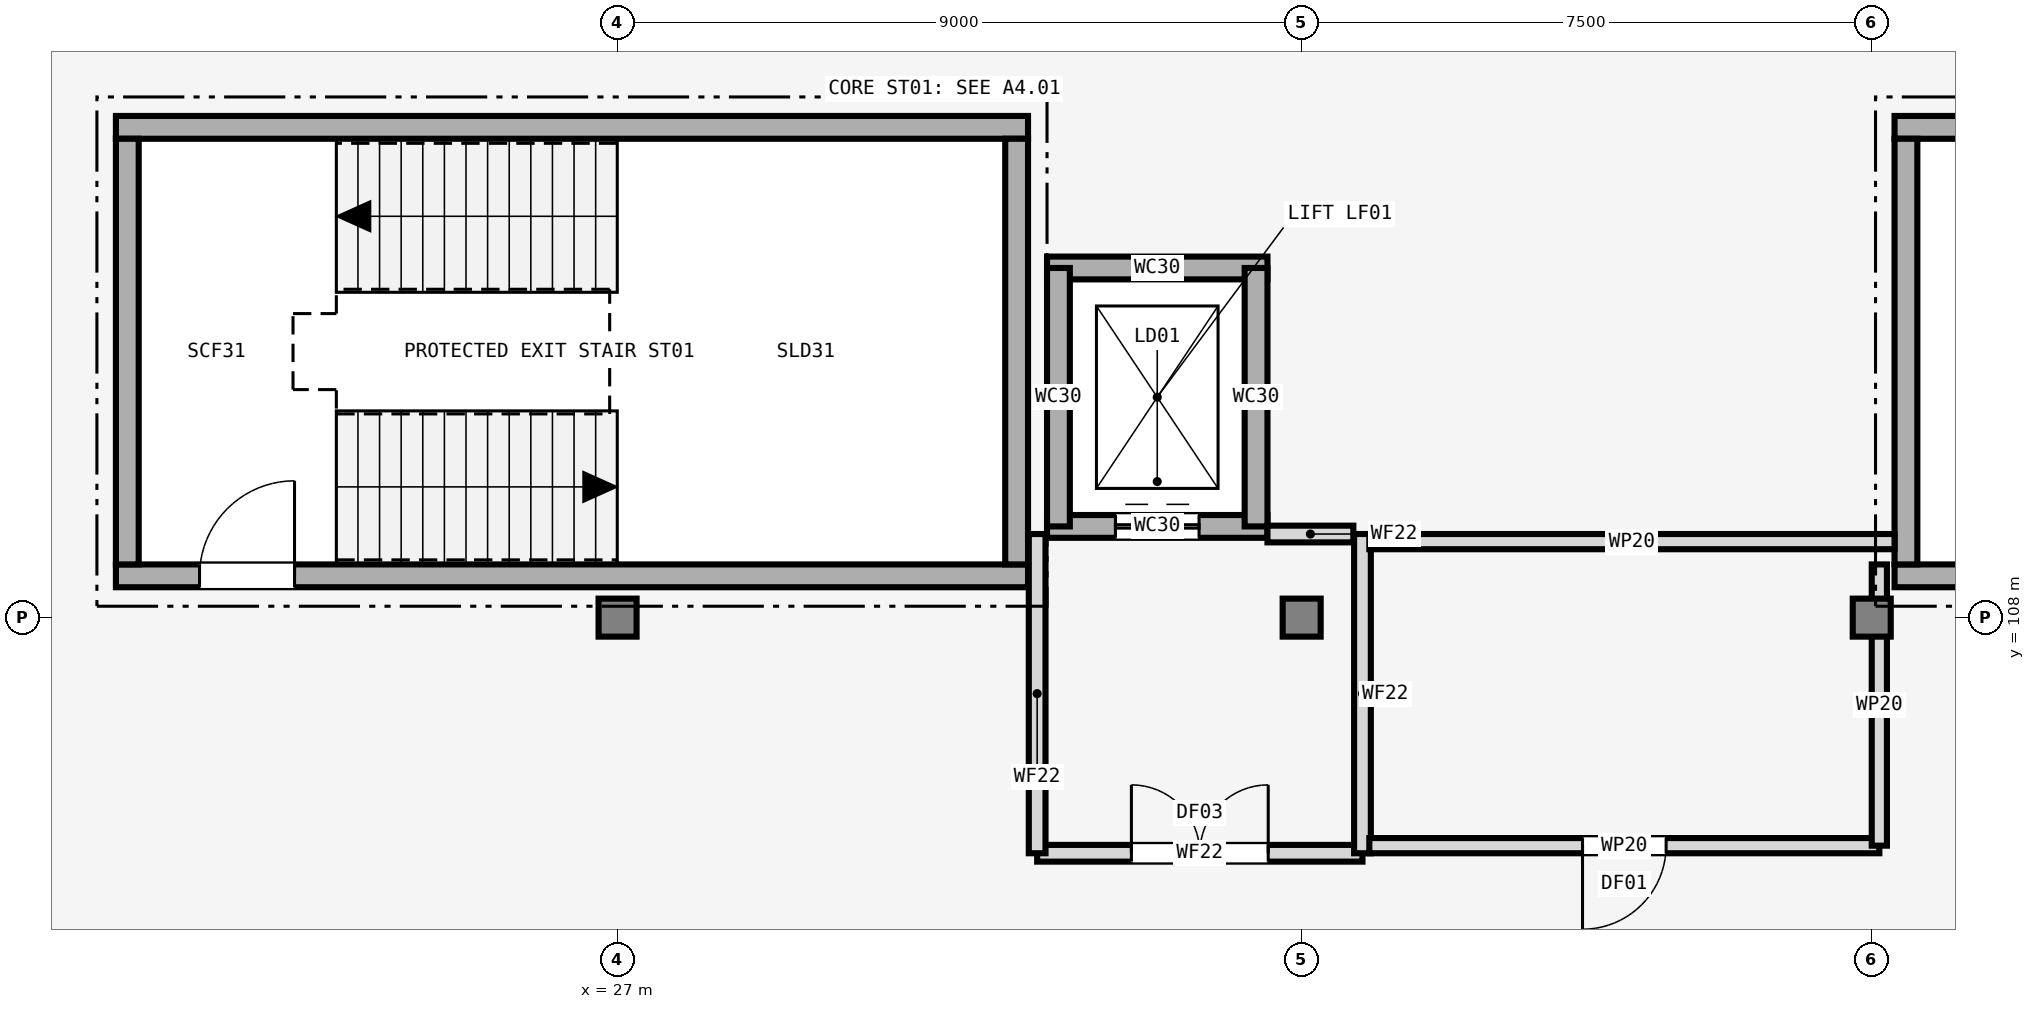
"""IFC4 building model, lengths in metres.
Left out: names, types, materials, properties, quantities, classifications, styles, units other than length and angle.
Written with IfcOpenShell. Run it as: python <this file> out.ifc"""

import sys

from ifc_helpers import new_model, si_unit, direction, frame, frame_2d, origin, origin_2d, place, context, subcontext, project, spatial, rectangle, extrude, element, fill, save


model = new_model("IFC4")
c1 = context("Model", 3, precision=1e-05, world=origin(), true_north=direction((0.0, 1.0)))
c2 = subcontext(c1, "Body", "Model", "MODEL_VIEW")
j1 = project(units=[si_unit("LENGTHUNIT", "METRE"), si_unit("PLANEANGLEUNIT", "RADIAN")], contexts=[c1])
p1 = place(None, origin())
s1 = spatial("IfcSite", under=j1, at=p1, CompositionType="ELEMENT")
p2 = place(p1, origin())
s2 = spatial("IfcBuilding", under=s1, at=p2, CompositionType="ELEMENT")
p3 = place(p2, frame((0.0, 0.0, 13.5)))
s3 = spatial("IfcBuildingStorey", under=s2, at=p3, CompositionType="ELEMENT", Elevation=13.5)
for number, where, z_axis, x_axis in (
    (1, (27.0, 108.0, 0.0), (0.0, 0.0, 1.0), (1.0, 0.0, 0.0)),
    (2, (36.0, 108.0, 0.0), (0.0, 0.0, 1.0), (1.0, 0.0, 0.0)),
    (3, (43.5, 108.0, 0.0), (0.0, 0.0, 1.0), (1.0, 0.0, 0.0)),
):
    element("IfcColumn", number, at=place(p3, frame(where, z_axis=z_axis, x_axis=x_axis)), inside=s3, PredefinedType="COLUMN", context=c2, shape_type="SweptSolid", body=[
        extrude(rectangle(XDim=0.5, YDim=0.5, at=origin_2d()), origin(), (0.0, 0.0, 1.0), 4.2),
    ])
p4 = place(p3, frame((20.4, 108.55, 0.0), z_axis=(0.0, 0.0, 1.0), x_axis=(1.0, 0.0, 0.0)))
e4 = element("IfcWall", 4, at=p4, inside=s3, PredefinedType="SHEAR", context=c2, shape_type="SweptSolid", body=[
    extrude(rectangle(XDim=12.0, YDim=0.3, at=frame_2d((6.0, 0.0))), origin(), (0.0, 0.0, 1.0), 4.2),
])
p5 = place(p4, frame((1.1, 0.0, 0.0)))
e5 = element("IfcOpeningElement", 5, at=p5, cuts=e4, PredefinedType="OPENING", context=c2, shape_type="SweptSolid", body=[
    extrude(rectangle(XDim=1.25, YDim=2.15, at=frame_2d((0.625, 1.075))), frame((0.0, 0.16, 0.0), z_axis=(0.0, -1.0, 0.0), x_axis=(1.0, 0.0, 0.0)), (0.0, 0.0, 1.0), 0.32),
])
p6 = place(p3, frame((32.4, 114.45, 0.0), z_axis=(0.0, 0.0, 1.0), x_axis=(-1.0, 0.0, 0.0)))
e6 = element("IfcWall", 6, at=p6, inside=s3, PredefinedType="SHEAR", context=c2, shape_type="SweptSolid", body=[
    extrude(rectangle(XDim=12.0, YDim=0.3, at=frame_2d((6.0, 0.0))), origin(), (0.0, 0.0, 1.0), 4.2),
])
for number, where, z_axis, x_axis in (
    (7, (20.55, 114.3, 0.0), (0.0, 0.0, 1.0), (0.0, -1.0, 0.0)),
    (8, (32.25, 108.7, 0.0), (0.0, 0.0, 1.0), (0.0, 1.0, 0.0)),
):
    element("IfcWall", number, at=place(p3, frame(where, z_axis=z_axis, x_axis=x_axis)), inside=s3, PredefinedType="SHEAR", context=c2, shape_type="SweptSolid", body=[
        extrude(rectangle(XDim=5.6, YDim=0.3, at=frame_2d((2.8, 0.0))), origin(), (0.0, 0.0, 1.0), 4.2),
    ])
p7 = place(p3, frame((43.8, 108.55, 0.0), z_axis=(0.0, 0.0, 1.0), x_axis=(1.0, 0.0, 0.0)))
e9 = element("IfcWall", 9, at=p7, inside=s3, PredefinedType="SHEAR", context=c2, shape_type="SweptSolid", body=[
    extrude(rectangle(XDim=12.0, YDim=0.3, at=frame_2d((6.0, 0.0))), origin(), (0.0, 0.0, 1.0), 4.2),
])
p8 = place(p7, frame((1.1, 0.0, 0.0)))
e10 = element("IfcOpeningElement", 10, at=p8, cuts=e9, PredefinedType="OPENING", context=c2, shape_type="SweptSolid", body=[
    extrude(rectangle(XDim=1.25, YDim=2.15, at=frame_2d((0.625, 1.075))), frame((0.0, 0.16, 0.0), z_axis=(0.0, -1.0, 0.0), x_axis=(1.0, 0.0, 0.0)), (0.0, 0.0, 1.0), 0.32),
])
p9 = place(p3, frame((55.8, 114.45, 0.0), z_axis=(0.0, 0.0, 1.0), x_axis=(-1.0, 0.0, 0.0)))
e11 = element("IfcWall", 11, at=p9, inside=s3, PredefinedType="SHEAR", context=c2, shape_type="SweptSolid", body=[
    extrude(rectangle(XDim=12.0, YDim=0.3, at=frame_2d((6.0, 0.0))), origin(), (0.0, 0.0, 1.0), 4.2),
])
p10 = place(p3, frame((43.95, 114.3, 0.0), z_axis=(0.0, 0.0, 1.0), x_axis=(0.0, -1.0, 0.0)))
e12 = element("IfcWall", 12, at=p10, inside=s3, PredefinedType="SHEAR", context=c2, shape_type="SweptSolid", body=[
    extrude(rectangle(XDim=5.6, YDim=0.3, at=frame_2d((2.8, 0.0))), origin(), (0.0, 0.0, 1.0), 4.2),
])
p11 = place(p3, frame((32.65, 109.2, 0.0), z_axis=(0.0, 0.0, 1.0), x_axis=(1.0, 0.0, 0.0)))
e13 = element("IfcWall", 13, at=p11, inside=s3, PredefinedType="SHEAR", context=c2, shape_type="SweptSolid", body=[
    extrude(rectangle(XDim=2.9, YDim=0.3, at=frame_2d((1.45, 0.0))), origin(), (0.0, 0.0, 1.0), 4.2),
])
p12 = place(p11, frame((0.9, 0.0, 0.0)))
e14 = element("IfcOpeningElement", 14, at=p12, cuts=e13, PredefinedType="OPENING", context=c2, shape_type="SweptSolid", body=[
    extrude(rectangle(XDim=1.1, YDim=2.15, at=frame_2d((0.55, 1.075))), frame((0.0, 0.16, 0.0), z_axis=(0.0, -1.0, 0.0), x_axis=(1.0, 0.0, 0.0)), (0.0, 0.0, 1.0), 0.32),
])
p13 = place(p3, frame((35.55, 112.6, 0.0), z_axis=(0.0, 0.0, 1.0), x_axis=(-1.0, 0.0, 0.0)))
e15 = element("IfcWall", 15, at=p13, inside=s3, PredefinedType="SHEAR", context=c2, shape_type="SweptSolid", body=[
    extrude(rectangle(XDim=2.9, YDim=0.3, at=frame_2d((1.45, 0.0))), origin(), (0.0, 0.0, 1.0), 4.2),
])
for number, where, z_axis, x_axis in (
    (16, (32.8, 112.6, 0.0), (0.0, 0.0, 1.0), (0.0, -1.0, 0.0)),
    (17, (35.4, 109.2, 0.0), (0.0, 0.0, 1.0), (0.0, 1.0, 0.0)),
):
    element("IfcWall", number, at=place(p3, frame(where, z_axis=z_axis, x_axis=x_axis)), inside=s3, PredefinedType="SHEAR", context=c2, shape_type="SweptSolid", body=[
        extrude(rectangle(XDim=3.4, YDim=0.3, at=frame_2d((1.7, 0.0))), origin(), (0.0, 0.0, 1.0), 4.2),
    ])
p14 = place(p3, frame((32.52, 104.9, 0.0), z_axis=(0.0, 0.0, 1.0), x_axis=(1.0, 0.0, 0.0)))
e18 = element("IfcWall", 18, at=p14, inside=s3, PredefinedType="SOLIDWALL", context=c2, shape_type="SweptSolid", body=[
    extrude(rectangle(XDim=4.28, YDim=0.22, at=frame_2d((2.14, 0.0))), origin(), (0.0, 0.0, 1.0), 3.12),
])
p15 = place(p14, frame((1.24, 0.0, 0.0)))
e19 = element("IfcOpeningElement", 19, at=p15, cuts=e18, PredefinedType="OPENING", context=c2, shape_type="SweptSolid", body=[
    extrude(rectangle(XDim=1.8, YDim=2.2, at=frame_2d((0.9, 1.1))), frame((0.0, 0.12, 0.0), z_axis=(0.0, -1.0, 0.0), x_axis=(1.0, 0.0, 0.0)), (0.0, 0.0, 1.0), 0.24),
])
for number, where, z_axis, x_axis in (
    (20, (32.52, 104.9, 0.0), (0.0, 0.0, 1.0), (0.0, 1.0, 0.0)),
    (21, (36.8, 104.9, 0.0), (0.0, 0.0, 1.0), (0.0, 1.0, 0.0)),
):
    element("IfcWall", number, at=place(p3, frame(where, z_axis=z_axis, x_axis=x_axis)), inside=s3, PredefinedType="SOLIDWALL", context=c2, shape_type="SweptSolid", body=[
        extrude(rectangle(XDim=4.2, YDim=0.22, at=frame_2d((2.1, 0.0))), origin(), (0.0, 0.0, 1.0), 3.12),
    ])
p16 = place(p3, frame((35.55, 109.1, 0.0), z_axis=(0.0, 0.0, 1.0), x_axis=(1.0, 0.0, 0.0)))
e22 = element("IfcWall", 22, at=p16, inside=s3, PredefinedType="SOLIDWALL", context=c2, shape_type="SweptSolid", body=[
    extrude(rectangle(XDim=1.13, YDim=0.22, at=frame_2d((0.565, 0.0))), origin(), (0.0, 0.0, 1.0), 3.12),
])
p17 = place(p3, frame((43.6, 105.0, 0.0), z_axis=(0.0, 0.0, 1.0), x_axis=(-1.0, 0.0, 0.0)))
e23 = element("IfcWall", 23, at=p17, inside=s3, PredefinedType="PARTITIONING", context=c2, shape_type="SweptSolid", body=[
    extrude(rectangle(XDim=6.71, YDim=0.2, at=frame_2d((3.355, 0.0))), origin(), (0.0, 0.0, 1.0), 3.12),
])
p18 = place(p17, frame((2.805, 0.0, 0.0)))
e24 = element("IfcOpeningElement", 24, at=p18, cuts=e23, PredefinedType="OPENING", context=c2, shape_type="SweptSolid", body=[
    extrude(rectangle(XDim=1.1, YDim=2.15, at=frame_2d((0.55, 1.075))), frame((0.0, 0.11, 0.0), z_axis=(0.0, -1.0, 0.0), x_axis=(1.0, 0.0, 0.0)), (0.0, 0.0, 1.0), 0.22),
])
p19 = place(p3, frame((43.6, 108.7, 0.0), z_axis=(0.0, 0.0, 1.0), x_axis=(0.0, -1.0, 0.0)))
e25 = element("IfcWall", 25, at=p19, inside=s3, PredefinedType="PARTITIONING", context=c2, shape_type="SweptSolid", body=[
    extrude(rectangle(XDim=3.7, YDim=0.2, at=frame_2d((1.85, 0.0))), origin(), (0.0, 0.0, 1.0), 3.12),
])
p20 = place(p3, frame((36.89, 109.0, 0.0), z_axis=(0.0, 0.0, 1.0), x_axis=(1.0, 0.0, 0.0)))
e26 = element("IfcWall", 26, at=p20, inside=s3, PredefinedType="PARTITIONING", context=c2, shape_type="SweptSolid", body=[
    extrude(rectangle(XDim=6.91, YDim=0.2, at=frame_2d((3.455, 0.0))), origin(), (0.0, 0.0, 1.0), 3.12),
])
p21 = place(p5, origin())
e27 = element("IfcDoor", 27, at=p21, inside=s3, OperationType="SINGLE_SWING_RIGHT", PredefinedType="DOOR", context=c2, shape_type="SweptSolid", body=[
    extrude(rectangle(XDim=1.25, YDim=2.15, at=frame_2d((0.625, 1.075))), frame((0.0, 0.025, 0.0), z_axis=(0.0, -1.0, 0.0), x_axis=(1.0, 0.0, 0.0)), (0.0, 0.0, 1.0), 0.05),
])
fill(e5, e27)
p22 = place(p12, origin())
e28 = element("IfcDoor", 28, at=p22, inside=s3, OperationType="DOUBLE_DOOR_SLIDING", PredefinedType="DOOR", context=c2, shape_type="SweptSolid", body=[
    extrude(rectangle(XDim=1.1, YDim=2.15, at=frame_2d((0.55, 1.075))), frame((0.0, 0.025, 0.0), z_axis=(0.0, -1.0, 0.0), x_axis=(1.0, 0.0, 0.0)), (0.0, 0.0, 1.0), 0.05),
])
fill(e14, e28)
p23 = place(p15, origin())
e29 = element("IfcDoor", 29, at=p23, inside=s3, OperationType="DOUBLE_DOOR_SINGLE_SWING", PredefinedType="DOOR", context=c2, shape_type="SweptSolid", body=[
    extrude(rectangle(XDim=1.8, YDim=2.2, at=frame_2d((0.9, 1.1))), frame((0.0, 0.025, 0.0), z_axis=(0.0, -1.0, 0.0), x_axis=(1.0, 0.0, 0.0)), (0.0, 0.0, 1.0), 0.05),
])
fill(e19, e29)
p24 = place(p18, origin())
e30 = element("IfcDoor", 30, at=p24, inside=s3, OperationType="SINGLE_SWING_RIGHT", PredefinedType="DOOR", context=c2, shape_type="SweptSolid", body=[
    extrude(rectangle(XDim=1.1, YDim=2.15, at=frame_2d((0.55, 1.075))), frame((0.0, 0.025, 0.0), z_axis=(0.0, -1.0, 0.0), x_axis=(1.0, 0.0, 0.0)), (0.0, 0.0, 1.0), 0.05),
])
fill(e24, e30)
save(model, sys.argv[1])
